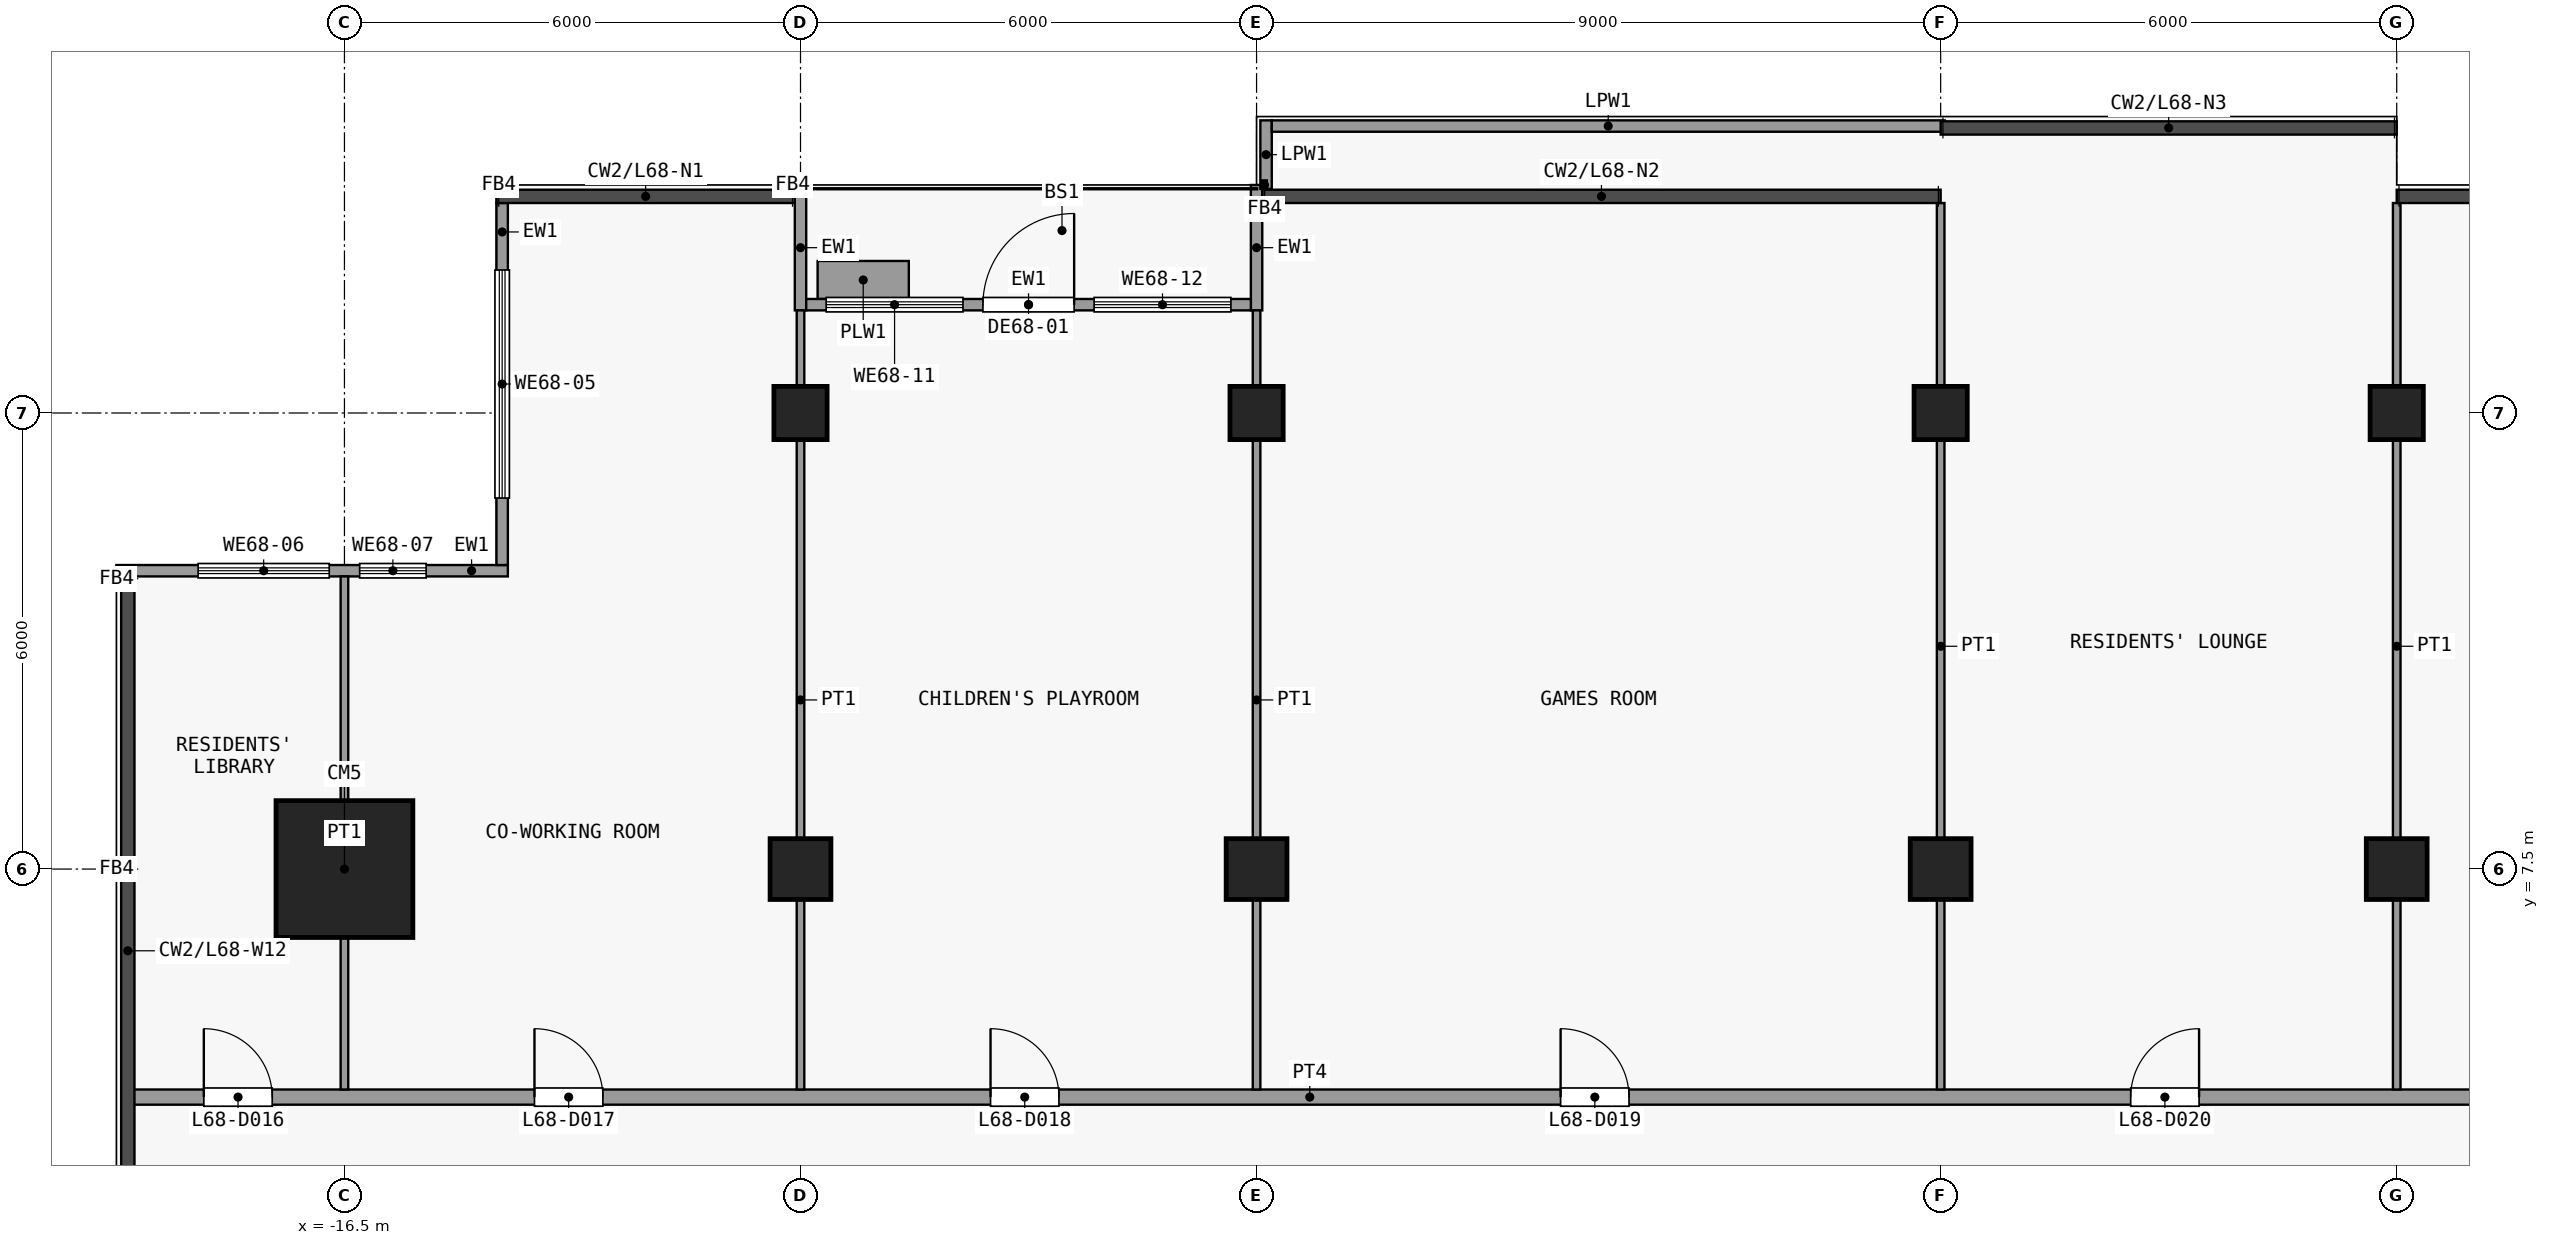
"""IFC4 building model, lengths in metres.
Left out: names, types, materials, properties, quantities, classifications, styles, units other than length and angle.
Written with IfcOpenShell. Run it as: python <this file> out.ifc"""

import sys

from ifc_helpers import new_model, si_unit, direction, frame, frame_2d, origin, origin_2d, place, context, subcontext, project, spatial, rectangle, extrude, element, fill, save


model = new_model("IFC4")
c1 = context("Model", 3, precision=1e-05, world=origin(), true_north=direction((0.0, 1.0)))
c2 = subcontext(c1, "Body", "Model", "MODEL_VIEW")
j1 = project(units=[si_unit("LENGTHUNIT", "METRE"), si_unit("PLANEANGLEUNIT", "RADIAN")], contexts=[c1])
p1 = place(None, origin())
s1 = spatial("IfcSite", under=j1, at=p1, CompositionType="ELEMENT")
p2 = place(p1, origin())
s2 = spatial("IfcBuilding", under=s1, at=p2, CompositionType="ELEMENT")
p3 = place(p2, frame((0.0, 0.0, 269.9)))
s3 = spatial("IfcBuildingStorey", under=s2, at=p3, CompositionType="ELEMENT", Elevation=269.9)
p4 = place(p3, frame((-16.5, 7.5, 0.0), z_axis=(0.0, 0.0, 1.0), x_axis=(1.0, 0.0, 0.0)))
e1 = element("IfcColumn", 1, at=p4, inside=s3, PredefinedType="COLUMN", context=c2, shape_type="SweptSolid", body=[
    extrude(rectangle(XDim=1.8, YDim=1.8, at=origin_2d()), origin(), (0.0, 0.0, 1.0), 3.6),
])
p5 = place(p3, frame((-10.5, 7.5, 0.0), z_axis=(0.0, 0.0, 1.0), x_axis=(1.0, 0.0, 0.0)))
e2 = element("IfcColumn", 2, at=p5, inside=s3, PredefinedType="COLUMN", context=c2, shape_type="SweptSolid", body=[
    extrude(rectangle(XDim=0.8, YDim=0.8, at=origin_2d()), origin(), (0.0, 0.0, 1.0), 3.6),
])
p6 = place(p3, frame((-10.5, 13.5, 0.0), z_axis=(0.0, 0.0, 1.0), x_axis=(1.0, 0.0, 0.0)))
e3 = element("IfcColumn", 3, at=p6, inside=s3, PredefinedType="COLUMN", context=c2, shape_type="SweptSolid", body=[
    extrude(rectangle(XDim=0.7, YDim=0.7, at=origin_2d()), origin(), (0.0, 0.0, 1.0), 3.6),
])
p7 = place(p3, frame((-4.5, 7.5, 0.0), z_axis=(0.0, 0.0, 1.0), x_axis=(1.0, 0.0, 0.0)))
e4 = element("IfcColumn", 4, at=p7, inside=s3, PredefinedType="COLUMN", context=c2, shape_type="SweptSolid", body=[
    extrude(rectangle(XDim=0.8, YDim=0.8, at=origin_2d()), origin(), (0.0, 0.0, 1.0), 3.6),
])
p8 = place(p3, frame((-4.5, 13.5, 0.0), z_axis=(0.0, 0.0, 1.0), x_axis=(1.0, 0.0, 0.0)))
e5 = element("IfcColumn", 5, at=p8, inside=s3, PredefinedType="COLUMN", context=c2, shape_type="SweptSolid", body=[
    extrude(rectangle(XDim=0.7, YDim=0.7, at=origin_2d()), origin(), (0.0, 0.0, 1.0), 3.6),
])
p9 = place(p3, frame((4.5, 7.5, 0.0), z_axis=(0.0, 0.0, 1.0), x_axis=(1.0, 0.0, 0.0)))
e6 = element("IfcColumn", 6, at=p9, inside=s3, PredefinedType="COLUMN", context=c2, shape_type="SweptSolid", body=[
    extrude(rectangle(XDim=0.8, YDim=0.8, at=origin_2d()), origin(), (0.0, 0.0, 1.0), 3.6),
])
p10 = place(p3, frame((4.5, 13.5, 0.0), z_axis=(0.0, 0.0, 1.0), x_axis=(1.0, 0.0, 0.0)))
e7 = element("IfcColumn", 7, at=p10, inside=s3, PredefinedType="COLUMN", context=c2, shape_type="SweptSolid", body=[
    extrude(rectangle(XDim=0.7, YDim=0.7, at=origin_2d()), origin(), (0.0, 0.0, 1.0), 3.6),
])
p11 = place(p3, frame((10.5, 7.5, 0.0), z_axis=(0.0, 0.0, 1.0), x_axis=(1.0, 0.0, 0.0)))
e8 = element("IfcColumn", 8, at=p11, inside=s3, PredefinedType="COLUMN", context=c2, shape_type="SweptSolid", body=[
    extrude(rectangle(XDim=0.8, YDim=0.8, at=origin_2d()), origin(), (0.0, 0.0, 1.0), 3.6),
])
p12 = place(p3, frame((10.5, 13.5, 0.0), z_axis=(0.0, 0.0, 1.0), x_axis=(1.0, 0.0, 0.0)))
e9 = element("IfcColumn", 9, at=p12, inside=s3, PredefinedType="COLUMN", context=c2, shape_type="SweptSolid", body=[
    extrude(rectangle(XDim=0.7, YDim=0.7, at=origin_2d()), origin(), (0.0, 0.0, 1.0), 3.6),
])
p13 = place(p3, frame((-14.425, 11.5, 0.0), z_axis=(0.0, 0.0, 1.0), x_axis=(0.0, 1.0, 0.0)))
e10 = element("IfcWall", 10, at=p13, inside=s3, PredefinedType="SOLIDWALL", context=c2, shape_type="SweptSolid", body=[
    extrude(rectangle(XDim=4.762, YDim=0.15, at=frame_2d((2.381, 0.0))), origin(), (0.0, 0.0, 1.0), 3.3),
])
p14 = place(p13, frame((0.881, 0.0, 0.9)))
e11 = element("IfcOpeningElement", 11, at=p14, cuts=e10, PredefinedType="OPENING", context=c2, shape_type="SweptSolid", body=[
    extrude(rectangle(XDim=3.0, YDim=2.4, at=frame_2d((1.5, 1.2))), frame((0.0, 0.085, 0.0), z_axis=(0.0, -1.0, 0.0), x_axis=(1.0, 0.0, 0.0)), (0.0, 0.0, 1.0), 0.17),
])
p15 = place(p3, frame((-19.5, 11.425, 0.0), z_axis=(0.0, 0.0, 1.0), x_axis=(1.0, 0.0, 0.0)))
e12 = element("IfcWall", 12, at=p15, inside=s3, PredefinedType="SOLIDWALL", context=c2, shape_type="SweptSolid", body=[
    extrude(rectangle(XDim=5.15, YDim=0.15, at=frame_2d((2.575, 0.0))), origin(), (0.0, 0.0, 1.0), 3.3),
])
p16 = place(p15, frame((1.075, 0.0, 0.9)))
e13 = element("IfcOpeningElement", 13, at=p16, cuts=e12, PredefinedType="OPENING", context=c2, shape_type="SweptSolid", body=[
    extrude(rectangle(XDim=1.725, YDim=2.4, at=frame_2d((0.863, 1.2))), frame((0.0, 0.085, 0.0), z_axis=(0.0, -1.0, 0.0), x_axis=(1.0, 0.0, 0.0)), (0.0, 0.0, 1.0), 0.17),
])
p17 = place(p15, frame((3.2, 0.0, 0.9)))
e14 = element("IfcOpeningElement", 14, at=p17, cuts=e12, PredefinedType="OPENING", context=c2, shape_type="SweptSolid", body=[
    extrude(rectangle(XDim=0.875, YDim=2.4, at=frame_2d((0.438, 1.2))), frame((0.0, 0.085, 0.0), z_axis=(0.0, -1.0, 0.0), x_axis=(1.0, 0.0, 0.0)), (0.0, 0.0, 1.0), 0.17),
])
for number, where, z_axis, x_axis in (
    (15, (-10.5, 14.85, 0.0), (0.0, 0.0, 1.0), (0.0, 1.0, 0.0)),
    (16, (-4.5, 14.85, 0.0), (0.0, 0.0, 1.0), (0.0, 1.0, 0.0)),
):
    element("IfcWall", number, at=place(p3, frame(where, z_axis=z_axis, x_axis=x_axis)), inside=s3, PredefinedType="SOLIDWALL", context=c2, shape_type="SweptSolid", body=[
        extrude(rectangle(XDim=1.65, YDim=0.15, at=frame_2d((0.825, 0.0))), origin(), (0.0, 0.0, 1.0), 3.3),
    ])
p18 = place(p3, frame((-10.425, 14.925, 0.0), z_axis=(0.0, 0.0, 1.0), x_axis=(1.0, 0.0, 0.0)))
e17 = element("IfcWall", 17, at=p18, inside=s3, PredefinedType="SOLIDWALL", context=c2, shape_type="SweptSolid", body=[
    extrude(rectangle(XDim=5.85, YDim=0.15, at=frame_2d((2.925, 0.0))), origin(), (0.0, 0.0, 1.0), 3.3),
])
p19 = place(p18, frame((2.325, 0.0, 0.0)))
e18 = element("IfcOpeningElement", 18, at=p19, cuts=e17, PredefinedType="OPENING", context=c2, shape_type="SweptSolid", body=[
    extrude(rectangle(XDim=1.2, YDim=2.4, at=frame_2d((0.6, 1.2))), frame((0.0, 0.085, 0.0), z_axis=(0.0, -1.0, 0.0), x_axis=(1.0, 0.0, 0.0)), (0.0, 0.0, 1.0), 0.17),
])
p20 = place(p18, frame((0.262, 0.0, 0.9)))
e19 = element("IfcOpeningElement", 19, at=p20, cuts=e17, PredefinedType="OPENING", context=c2, shape_type="SweptSolid", body=[
    extrude(rectangle(XDim=1.8, YDim=2.1, at=frame_2d((0.9, 1.05))), frame((0.0, 0.085, 0.0), z_axis=(0.0, -1.0, 0.0), x_axis=(1.0, 0.0, 0.0)), (0.0, 0.0, 1.0), 0.17),
])
p21 = place(p18, frame((3.788, 0.0, 0.9)))
e20 = element("IfcOpeningElement", 20, at=p21, cuts=e17, PredefinedType="OPENING", context=c2, shape_type="SweptSolid", body=[
    extrude(rectangle(XDim=1.8, YDim=2.1, at=frame_2d((0.9, 1.05))), frame((0.0, 0.085, 0.0), z_axis=(0.0, -1.0, 0.0), x_axis=(1.0, 0.0, 0.0)), (0.0, 0.0, 1.0), 0.17),
])
p22 = place(p3, frame((-10.275, 15.25, 0.0), z_axis=(0.0, 0.0, 1.0), x_axis=(1.0, 0.0, 0.0)))
e21 = element("IfcWall", 21, at=p22, inside=s3, PredefinedType="USERDEFINED", context=c2, shape_type="SweptSolid", body=[
    extrude(rectangle(XDim=1.2, YDim=0.5, at=frame_2d((0.6, 0.0))), origin(), (0.0, 0.0, 1.0), 0.9),
])
p23 = place(p3, frame((-4.375, 16.448, 0.0), z_axis=(0.0, 0.0, 1.0), x_axis=(0.0, 1.0, 0.0)))
e22 = element("IfcWall", 22, at=p23, inside=s3, PredefinedType="PARAPET", context=c2, shape_type="SweptSolid", body=[
    extrude(rectangle(XDim=0.903, YDim=0.15, at=frame_2d((0.451, 0.0))), origin(), (0.0, 0.0, 1.0), 1.15),
])
p24 = place(p3, frame((-4.3, 17.275, 0.0), z_axis=(0.0, 0.0, 1.0), x_axis=(1.0, 0.0, 0.0)))
e23 = element("IfcWall", 23, at=p24, inside=s3, PredefinedType="PARAPET", context=c2, shape_type="SweptSolid", body=[
    extrude(rectangle(XDim=8.853, YDim=0.15, at=frame_2d((4.426, 0.0))), origin(), (0.0, 0.0, 1.0), 1.15),
])
p25 = place(p3, frame((-19.35, 4.5, 0.0), z_axis=(0.0, 0.0, 1.0), x_axis=(1.0, 0.0, 0.0)))
e24 = element("IfcWall", 24, at=p25, inside=s3, PredefinedType="PARTITIONING", context=c2, shape_type="SweptSolid", body=[
    extrude(rectangle(XDim=39.6, YDim=0.2, at=frame_2d((19.8, 0.0))), origin(), (0.0, 0.0, 1.0), 3.3),
])
p26 = place(p25, frame((1.0, 0.0, 0.0)))
e25 = element("IfcOpeningElement", 25, at=p26, cuts=e24, PredefinedType="OPENING", context=c2, shape_type="SweptSolid", body=[
    extrude(rectangle(XDim=0.9, YDim=2.1, at=frame_2d((0.45, 1.05))), frame((0.0, 0.11, 0.0), z_axis=(0.0, -1.0, 0.0), x_axis=(1.0, 0.0, 0.0)), (0.0, 0.0, 1.0), 0.22),
])
p27 = place(p25, frame((5.35, 0.0, 0.0)))
e26 = element("IfcOpeningElement", 26, at=p27, cuts=e24, PredefinedType="OPENING", context=c2, shape_type="SweptSolid", body=[
    extrude(rectangle(XDim=0.9, YDim=2.1, at=frame_2d((0.45, 1.05))), frame((0.0, 0.11, 0.0), z_axis=(0.0, -1.0, 0.0), x_axis=(1.0, 0.0, 0.0)), (0.0, 0.0, 1.0), 0.22),
])
p28 = place(p25, frame((11.35, 0.0, 0.0)))
e27 = element("IfcOpeningElement", 27, at=p28, cuts=e24, PredefinedType="OPENING", context=c2, shape_type="SweptSolid", body=[
    extrude(rectangle(XDim=0.9, YDim=2.1, at=frame_2d((0.45, 1.05))), frame((0.0, 0.11, 0.0), z_axis=(0.0, -1.0, 0.0), x_axis=(1.0, 0.0, 0.0)), (0.0, 0.0, 1.0), 0.22),
])
p29 = place(p25, frame((18.85, 0.0, 0.0)))
e28 = element("IfcOpeningElement", 28, at=p29, cuts=e24, PredefinedType="OPENING", context=c2, shape_type="SweptSolid", body=[
    extrude(rectangle(XDim=0.9, YDim=2.1, at=frame_2d((0.45, 1.05))), frame((0.0, 0.11, 0.0), z_axis=(0.0, -1.0, 0.0), x_axis=(1.0, 0.0, 0.0)), (0.0, 0.0, 1.0), 0.22),
])
p30 = place(p25, frame((26.35, 0.0, 0.0)))
e29 = element("IfcOpeningElement", 29, at=p30, cuts=e24, PredefinedType="OPENING", context=c2, shape_type="SweptSolid", body=[
    extrude(rectangle(XDim=0.9, YDim=2.1, at=frame_2d((0.45, 1.05))), frame((0.0, 0.11, 0.0), z_axis=(0.0, -1.0, 0.0), x_axis=(1.0, 0.0, 0.0)), (0.0, 0.0, 1.0), 0.22),
])
p31 = place(p25, frame((32.35, 0.0, 0.0)))
e30 = element("IfcOpeningElement", 30, at=p31, cuts=e24, PredefinedType="OPENING", context=c2, shape_type="SweptSolid", body=[
    extrude(rectangle(XDim=0.9, YDim=2.1, at=frame_2d((0.45, 1.05))), frame((0.0, 0.11, 0.0), z_axis=(0.0, -1.0, 0.0), x_axis=(1.0, 0.0, 0.0)), (0.0, 0.0, 1.0), 0.22),
])
p32 = place(p25, frame((37.25, 0.0, 0.0)))
e31 = element("IfcOpeningElement", 31, at=p32, cuts=e24, PredefinedType="OPENING", context=c2, shape_type="SweptSolid", body=[
    extrude(rectangle(XDim=0.9, YDim=2.1, at=frame_2d((0.45, 1.05))), frame((0.0, 0.11, 0.0), z_axis=(0.0, -1.0, 0.0), x_axis=(1.0, 0.0, 0.0)), (0.0, 0.0, 1.0), 0.22),
])
p33 = place(p3, frame((-16.5, 4.6, 0.0), z_axis=(0.0, 0.0, 1.0), x_axis=(0.0, 1.0, 0.0)))
e32 = element("IfcWall", 32, at=p33, inside=s3, PredefinedType="PARTITIONING", context=c2, shape_type="SweptSolid", body=[
    extrude(rectangle(XDim=6.75, YDim=0.1, at=frame_2d((3.375, 0.0))), origin(), (0.0, 0.0, 1.0), 3.3),
])
for number, where, z_axis, x_axis in (
    (33, (-10.5, 4.6, 0.0), (0.0, 0.0, 1.0), (0.0, 1.0, 0.0)),
    (34, (-4.5, 4.6, 0.0), (0.0, 0.0, 1.0), (0.0, 1.0, 0.0)),
):
    element("IfcWall", number, at=place(p3, frame(where, z_axis=z_axis, x_axis=x_axis)), inside=s3, PredefinedType="PARTITIONING", context=c2, shape_type="SweptSolid", body=[
        extrude(rectangle(XDim=10.25, YDim=0.1, at=frame_2d((5.125, 0.0))), origin(), (0.0, 0.0, 1.0), 3.3),
    ])
for number, where, z_axis, x_axis in (
    (35, (4.5, 4.6, 0.0), (0.0, 0.0, 1.0), (0.0, 1.0, 0.0)),
    (36, (10.5, 4.6, 0.0), (0.0, 0.0, 1.0), (0.0, 1.0, 0.0)),
):
    element("IfcWall", number, at=place(p3, frame(where, z_axis=z_axis, x_axis=x_axis)), inside=s3, PredefinedType="PARTITIONING", context=c2, shape_type="SweptSolid", body=[
        extrude(rectangle(XDim=11.662, YDim=0.1, at=frame_2d((5.831, 0.0))), origin(), (0.0, 0.0, 1.0), 3.3),
    ])
p34 = place(p14, origin())
e37 = element("IfcWindow", 37, at=p34, inside=s3, PartitioningType="SINGLE_PANEL", PredefinedType="WINDOW", context=c2, shape_type="SweptSolid", body=[
    extrude(rectangle(XDim=3.0, YDim=2.4, at=frame_2d((1.5, 1.2))), frame((0.0, 0.03, 0.0), z_axis=(0.0, -1.0, 0.0), x_axis=(1.0, 0.0, 0.0)), (0.0, 0.0, 1.0), 0.06),
])
fill(e11, e37)
p35 = place(p16, origin())
e38 = element("IfcWindow", 38, at=p35, inside=s3, PartitioningType="SINGLE_PANEL", PredefinedType="WINDOW", context=c2, shape_type="SweptSolid", body=[
    extrude(rectangle(XDim=1.725, YDim=2.4, at=frame_2d((0.863, 1.2))), frame((0.0, 0.03, 0.0), z_axis=(0.0, -1.0, 0.0), x_axis=(1.0, 0.0, 0.0)), (0.0, 0.0, 1.0), 0.06),
])
fill(e13, e38)
p36 = place(p17, origin())
e39 = element("IfcWindow", 39, at=p36, inside=s3, PartitioningType="SINGLE_PANEL", PredefinedType="WINDOW", context=c2, shape_type="SweptSolid", body=[
    extrude(rectangle(XDim=0.875, YDim=2.4, at=frame_2d((0.438, 1.2))), frame((0.0, 0.03, 0.0), z_axis=(0.0, -1.0, 0.0), x_axis=(1.0, 0.0, 0.0)), (0.0, 0.0, 1.0), 0.06),
])
fill(e14, e39)
p37 = place(p19, origin())
e40 = element("IfcDoor", 40, at=p37, inside=s3, OperationType="SINGLE_SWING_RIGHT", PredefinedType="DOOR", context=c2, shape_type="SweptSolid", body=[
    extrude(rectangle(XDim=1.2, YDim=2.4, at=frame_2d((0.6, 1.2))), frame((0.0, 0.025, 0.0), z_axis=(0.0, -1.0, 0.0), x_axis=(1.0, 0.0, 0.0)), (0.0, 0.0, 1.0), 0.05),
])
fill(e18, e40)
p38 = place(p20, origin())
e41 = element("IfcWindow", 41, at=p38, inside=s3, PartitioningType="SINGLE_PANEL", PredefinedType="WINDOW", context=c2, shape_type="SweptSolid", body=[
    extrude(rectangle(XDim=1.8, YDim=2.1, at=frame_2d((0.9, 1.05))), frame((0.0, 0.03, 0.0), z_axis=(0.0, -1.0, 0.0), x_axis=(1.0, 0.0, 0.0)), (0.0, 0.0, 1.0), 0.06),
])
fill(e19, e41)
p39 = place(p21, origin())
e42 = element("IfcWindow", 42, at=p39, inside=s3, PartitioningType="SINGLE_PANEL", PredefinedType="WINDOW", context=c2, shape_type="SweptSolid", body=[
    extrude(rectangle(XDim=1.8, YDim=2.1, at=frame_2d((0.9, 1.05))), frame((0.0, 0.03, 0.0), z_axis=(0.0, -1.0, 0.0), x_axis=(1.0, 0.0, 0.0)), (0.0, 0.0, 1.0), 0.06),
])
fill(e20, e42)
p40 = place(p26, origin())
e43 = element("IfcDoor", 43, at=p40, inside=s3, OperationType="SINGLE_SWING_RIGHT", PredefinedType="DOOR", context=c2, shape_type="SweptSolid", body=[
    extrude(rectangle(XDim=0.9, YDim=2.1, at=frame_2d((0.45, 1.05))), frame((0.0, 0.025, 0.0), z_axis=(0.0, -1.0, 0.0), x_axis=(1.0, 0.0, 0.0)), (0.0, 0.0, 1.0), 0.05),
])
fill(e25, e43)
p41 = place(p27, origin())
e44 = element("IfcDoor", 44, at=p41, inside=s3, OperationType="SINGLE_SWING_RIGHT", PredefinedType="DOOR", context=c2, shape_type="SweptSolid", body=[
    extrude(rectangle(XDim=0.9, YDim=2.1, at=frame_2d((0.45, 1.05))), frame((0.0, 0.025, 0.0), z_axis=(0.0, -1.0, 0.0), x_axis=(1.0, 0.0, 0.0)), (0.0, 0.0, 1.0), 0.05),
])
fill(e26, e44)
p42 = place(p28, origin())
e45 = element("IfcDoor", 45, at=p42, inside=s3, OperationType="SINGLE_SWING_RIGHT", PredefinedType="DOOR", context=c2, shape_type="SweptSolid", body=[
    extrude(rectangle(XDim=0.9, YDim=2.1, at=frame_2d((0.45, 1.05))), frame((0.0, 0.025, 0.0), z_axis=(0.0, -1.0, 0.0), x_axis=(1.0, 0.0, 0.0)), (0.0, 0.0, 1.0), 0.05),
])
fill(e27, e45)
p43 = place(p29, origin())
e46 = element("IfcDoor", 46, at=p43, inside=s3, OperationType="SINGLE_SWING_RIGHT", PredefinedType="DOOR", context=c2, shape_type="SweptSolid", body=[
    extrude(rectangle(XDim=0.9, YDim=2.1, at=frame_2d((0.45, 1.05))), frame((0.0, 0.025, 0.0), z_axis=(0.0, -1.0, 0.0), x_axis=(1.0, 0.0, 0.0)), (0.0, 0.0, 1.0), 0.05),
])
fill(e28, e46)
p44 = place(p30, origin())
e47 = element("IfcDoor", 47, at=p44, inside=s3, OperationType="SINGLE_SWING_LEFT", PredefinedType="DOOR", context=c2, shape_type="SweptSolid", body=[
    extrude(rectangle(XDim=0.9, YDim=2.1, at=frame_2d((0.45, 1.05))), frame((0.0, 0.025, 0.0), z_axis=(0.0, -1.0, 0.0), x_axis=(1.0, 0.0, 0.0)), (0.0, 0.0, 1.0), 0.05),
])
fill(e29, e47)
save(model, sys.argv[1])
